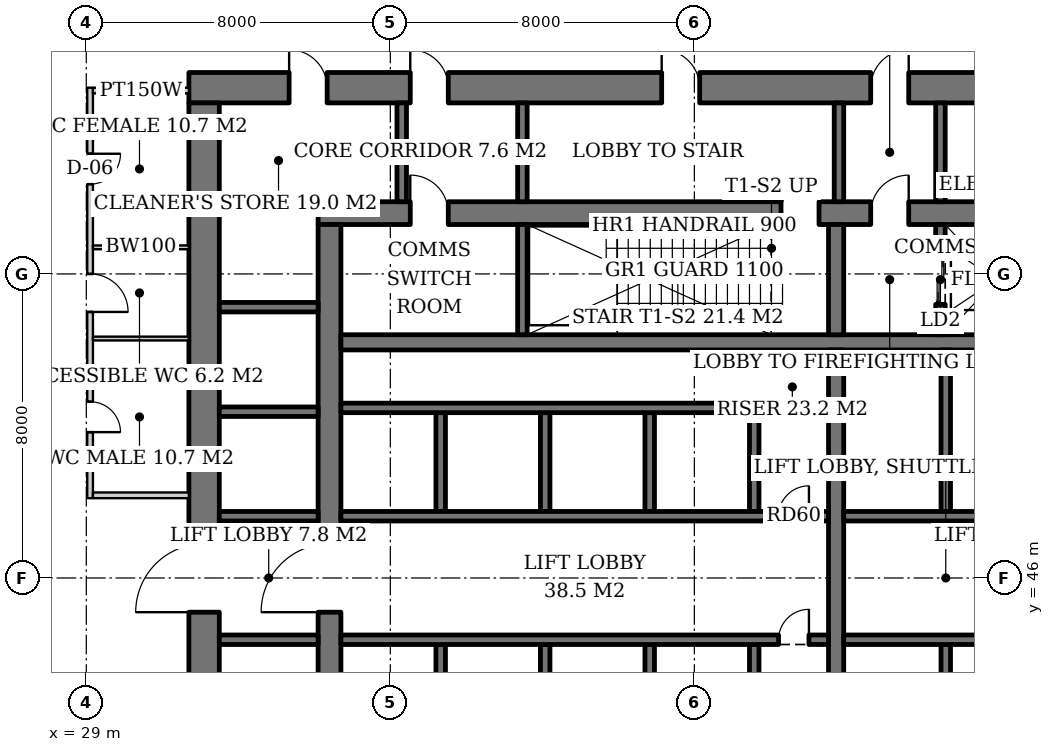
"""IFC4 building model, lengths in metres.
Left out: names, types, materials, properties, quantities, classifications, styles, units other than length and angle.
Written with IfcOpenShell. Run it as: python <this file> out.ifc"""

import sys

from ifc_helpers import new_model, si_unit, direction, frame, frame_2d, origin, place, context, subcontext, project, spatial, rectangle, extrude, element, fill, save


model = new_model("IFC4")
c1 = context("Model", 3, precision=1e-05, world=origin(), true_north=direction((0.0, 1.0)))
c2 = subcontext(c1, "Body", "Model", "MODEL_VIEW")
j1 = project(units=[si_unit("LENGTHUNIT", "METRE"), si_unit("PLANEANGLEUNIT", "RADIAN")], contexts=[c1])
p1 = place(None, origin())
s1 = spatial("IfcSite", under=j1, at=p1, CompositionType="ELEMENT")
p2 = place(p1, origin())
s2 = spatial("IfcBuilding", under=s1, at=p2, CompositionType="ELEMENT")
p3 = place(p2, frame((0.0, 0.0, -5.0)))
s3 = spatial("IfcBuildingStorey", under=s2, at=p3, CompositionType="ELEMENT", Elevation=-5.0)
p4 = place(p3, frame((35.1, 55.6, 0.0), z_axis=(0.0, 0.0, 1.0), x_axis=(1.0, 0.0, 0.0)))
e1 = element("IfcWall", 1, at=p4, inside=s3, PredefinedType="SHEAR", context=c2, shape_type="SweptSolid", body=[
    extrude(rectangle(XDim=19.8, YDim=0.6, at=frame_2d((9.9, 0.0))), origin(), (0.0, 0.0, 1.0), 5.0),
])
p5 = place(p4, frame((14.54, 0.0, 0.0)))
e2 = element("IfcOpeningElement", 2, at=p5, cuts=e1, PredefinedType="OPENING", context=c2, shape_type="SweptSolid", body=[
    extrude(rectangle(XDim=1.0, YDim=2.1, at=frame_2d((0.5, 1.05))), frame((0.0, 0.31, 0.0), z_axis=(0.0, -1.0, 0.0), x_axis=(1.0, 0.0, 0.0)), (0.0, 0.0, 1.0), 0.62),
])
p6 = place(p4, frame((12.18, 0.0, 0.0)))
e3 = element("IfcOpeningElement", 3, at=p6, cuts=e1, PredefinedType="OPENING", context=c2, shape_type="SweptSolid", body=[
    extrude(rectangle(XDim=1.0, YDim=2.1, at=frame_2d((0.5, 1.05))), frame((0.0, 0.31, 0.0), z_axis=(0.0, -1.0, 0.0), x_axis=(1.0, 0.0, 0.0)), (0.0, 0.0, 1.0), 0.62),
])
p7 = place(p4, frame((2.425, 0.0, 0.0)))
e4 = element("IfcOpeningElement", 4, at=p7, cuts=e1, PredefinedType="OPENING", context=c2, shape_type="SweptSolid", body=[
    extrude(rectangle(XDim=1.0, YDim=2.1, at=frame_2d((0.5, 1.05))), frame((0.0, 0.31, 0.0), z_axis=(0.0, -1.0, 0.0), x_axis=(1.0, 0.0, 0.0)), (0.0, 0.0, 1.0), 0.62),
])
p8 = place(p3, frame((35.4, 36.7, 0.0), z_axis=(0.0, 0.0, 1.0), x_axis=(0.0, 1.0, 0.0)))
e5 = element("IfcWall", 5, at=p8, inside=s3, PredefinedType="SHEAR", context=c2, shape_type="SweptSolid", body=[
    extrude(rectangle(XDim=18.6, YDim=0.6, at=frame_2d((9.3, 0.0))), origin(), (0.0, 0.0, 1.0), 5.0),
])
p9 = place(p8, frame((8.4, 0.0, 0.0)))
e6 = element("IfcOpeningElement", 6, at=p9, cuts=e5, PredefinedType="OPENING", context=c2, shape_type="SweptSolid", body=[
    extrude(rectangle(XDim=1.8, YDim=2.4, at=frame_2d((0.9, 1.2))), frame((0.0, 0.31, 0.0), z_axis=(0.0, -1.0, 0.0), x_axis=(1.0, 0.0, 0.0)), (0.0, 0.0, 1.0), 0.62),
])
p10 = place(p3, frame((31.7, 58.9, 0.0), z_axis=(0.0, 0.0, 1.0), x_axis=(1.0, 0.0, 0.0)))
e7 = element("IfcWall", 7, at=p10, inside=s3, PredefinedType="SHEAR", context=c2, shape_type="SweptSolid", body=[
    extrude(rectangle(XDim=26.6, YDim=0.8, at=frame_2d((13.3, 0.0))), origin(), (0.0, 0.0, 1.0), 5.0),
])
p11 = place(p10, frame((17.94, 0.0, 0.0)))
e8 = element("IfcOpeningElement", 8, at=p11, cuts=e7, PredefinedType="OPENING", context=c2, shape_type="SweptSolid", body=[
    extrude(rectangle(XDim=1.0, YDim=2.1, at=frame_2d((0.5, 1.05))), frame((0.0, 0.41, 0.0), z_axis=(0.0, -1.0, 0.0), x_axis=(1.0, 0.0, 0.0)), (0.0, 0.0, 1.0), 0.82),
])
p12 = place(p10, frame((12.44, 0.0, 0.0)))
e9 = element("IfcOpeningElement", 9, at=p12, cuts=e7, PredefinedType="OPENING", context=c2, shape_type="SweptSolid", body=[
    extrude(rectangle(XDim=1.0, YDim=2.1, at=frame_2d((0.5, 1.05))), frame((0.0, 0.41, 0.0), z_axis=(0.0, -1.0, 0.0), x_axis=(1.0, 0.0, 0.0)), (0.0, 0.0, 1.0), 0.82),
])
p13 = place(p10, frame((5.825, 0.0, 0.0)))
e10 = element("IfcOpeningElement", 10, at=p13, cuts=e7, PredefinedType="OPENING", context=c2, shape_type="SweptSolid", body=[
    extrude(rectangle(XDim=1.0, YDim=2.1, at=frame_2d((0.5, 1.05))), frame((0.0, 0.41, 0.0), z_axis=(0.0, -1.0, 0.0), x_axis=(1.0, 0.0, 0.0)), (0.0, 0.0, 1.0), 0.82),
])
p14 = place(p10, frame((2.637, 0.0, 0.0)))
e11 = element("IfcOpeningElement", 11, at=p14, cuts=e7, PredefinedType="OPENING", context=c2, shape_type="SweptSolid", body=[
    extrude(rectangle(XDim=1.0, YDim=2.1, at=frame_2d((0.5, 1.05))), frame((0.0, 0.41, 0.0), z_axis=(0.0, -1.0, 0.0), x_axis=(1.0, 0.0, 0.0)), (0.0, 0.0, 1.0), 0.82),
])
p15 = place(p10, frame((20.875, 0.0, 0.0)))
e12 = element("IfcOpeningElement", 12, at=p15, cuts=e7, PredefinedType="OPENING", context=c2, shape_type="SweptSolid", body=[
    extrude(rectangle(XDim=1.0, YDim=2.1, at=frame_2d((0.5, 1.05))), frame((0.0, 0.41, 0.0), z_axis=(0.0, -1.0, 0.0), x_axis=(1.0, 0.0, 0.0)), (0.0, 0.0, 1.0), 0.82),
])
p16 = place(p10, frame((23.7, 0.0, 0.0)))
e13 = element("IfcOpeningElement", 13, at=p16, cuts=e7, PredefinedType="OPENING", context=c2, shape_type="SweptSolid", body=[
    extrude(rectangle(XDim=1.0, YDim=2.1, at=frame_2d((0.5, 1.05))), frame((0.0, 0.41, 0.0), z_axis=(0.0, -1.0, 0.0), x_axis=(1.0, 0.0, 0.0)), (0.0, 0.0, 1.0), 0.82),
])
p17 = place(p3, frame((32.1, 33.5, 0.0), z_axis=(0.0, 0.0, 1.0), x_axis=(0.0, 1.0, 0.0)))
e14 = element("IfcWall", 14, at=p17, inside=s3, PredefinedType="SHEAR", context=c2, shape_type="SweptSolid", body=[
    extrude(rectangle(XDim=25.0, YDim=0.8, at=frame_2d((12.5, 0.0))), origin(), (0.0, 0.0, 1.0), 5.0),
])
p18 = place(p17, frame((11.6, 0.0, 0.0)))
e15 = element("IfcOpeningElement", 15, at=p18, cuts=e14, PredefinedType="OPENING", context=c2, shape_type="SweptSolid", body=[
    extrude(rectangle(XDim=1.8, YDim=2.4, at=frame_2d((0.9, 1.2))), frame((0.0, 0.41, 0.0), z_axis=(0.0, -1.0, 0.0), x_axis=(1.0, 0.0, 0.0)), (0.0, 0.0, 1.0), 0.82),
])
p19 = place(p3, frame((35.7, 52.2, 0.0), z_axis=(0.0, 0.0, 1.0), x_axis=(1.0, 0.0, 0.0)))
e16 = element("IfcWall", 16, at=p19, inside=s3, PredefinedType="SHEAR", context=c2, shape_type="SweptSolid", body=[
    extrude(rectangle(XDim=18.6, YDim=0.4, at=frame_2d((9.3, 0.0))), origin(), (0.0, 0.0, 1.0), 5.0),
])
p20 = place(p3, frame((48.73, 40.0, 0.0), z_axis=(0.0, 0.0, 1.0), x_axis=(0.0, 1.0, 0.0)))
e17 = element("IfcWall", 17, at=p20, inside=s3, PredefinedType="SHEAR", context=c2, shape_type="SweptSolid", body=[
    extrude(rectangle(XDim=12.0, YDim=0.4, at=frame_2d((6.0, 0.0))), origin(), (0.0, 0.0, 1.0), 5.0),
])
p21 = place(p3, frame((48.73, 52.4, 0.0), z_axis=(0.0, 0.0, 1.0), x_axis=(0.0, 1.0, 0.0)))
e18 = element("IfcWall", 18, at=p21, inside=s3, PredefinedType="SHEAR", context=c2, shape_type="SweptSolid", body=[
    extrude(rectangle(XDim=2.9, YDim=0.4, at=frame_2d((1.45, 0.0))), origin(), (0.0, 0.0, 1.0), 5.0),
])
p22 = place(p3, frame((40.475, 52.4, 0.0), z_axis=(0.0, 0.0, 1.0), x_axis=(0.0, 1.0, 0.0)))
e19 = element("IfcWall", 19, at=p22, inside=s3, PredefinedType="SHEAR", context=c2, shape_type="SweptSolid", body=[
    extrude(rectangle(XDim=2.9, YDim=0.25, at=frame_2d((1.45, 0.0))), origin(), (0.0, 0.0, 1.0), 5.0),
])
p23 = place(p3, frame((51.475, 52.4, 0.0), z_axis=(0.0, 0.0, 1.0), x_axis=(0.0, 1.0, 0.0)))
e20 = element("IfcWall", 20, at=p23, inside=s3, PredefinedType="SHEAR", context=c2, shape_type="SweptSolid", body=[
    extrude(rectangle(XDim=2.9, YDim=0.25, at=frame_2d((1.45, 0.0))), origin(), (0.0, 0.0, 1.0), 5.0),
])
p24 = place(p23, frame((0.8, 0.0, 0.0)))
e21 = element("IfcOpeningElement", 21, at=p24, cuts=e20, PredefinedType="OPENING", context=c2, shape_type="SweptSolid", body=[
    extrude(rectangle(XDim=1.3, YDim=2.2, at=frame_2d((0.65, 1.1))), frame((0.0, 0.135, 0.0), z_axis=(0.0, -1.0, 0.0), x_axis=(1.0, 0.0, 0.0)), (0.0, 0.0, 1.0), 0.27),
])
for number, where, z_axis, x_axis in (
    (22, (38.325, 47.75, 0.0), (0.0, 0.0, 1.0), (0.0, 1.0, 0.0)),
    (23, (41.075, 47.75, 0.0), (0.0, 0.0, 1.0), (0.0, 1.0, 0.0)),
    (24, (43.825, 47.75, 0.0), (0.0, 0.0, 1.0), (0.0, 1.0, 0.0)),
    (25, (46.575, 47.75, 0.0), (0.0, 0.0, 1.0), (0.0, 1.0, 0.0)),
):
    element("IfcWall", number, at=place(p3, frame(where, z_axis=z_axis, x_axis=x_axis)), inside=s3, PredefinedType="SHEAR", context=c2, shape_type="SweptSolid", body=[
        extrude(rectangle(XDim=2.6, YDim=0.25, at=frame_2d((1.3, 0.0))), origin(), (0.0, 0.0, 1.0), 5.0),
    ])
p25 = place(p3, frame((35.7, 50.475, 0.0), z_axis=(0.0, 0.0, 1.0), x_axis=(1.0, 0.0, 0.0)))
e26 = element("IfcWall", 26, at=p25, inside=s3, PredefinedType="SHEAR", context=c2, shape_type="SweptSolid", body=[
    extrude(rectangle(XDim=11.0, YDim=0.25, at=frame_2d((5.5, 0.0))), origin(), (0.0, 0.0, 1.0), 5.0),
])
p26 = place(p3, frame((35.7, 47.625, 0.0), z_axis=(0.0, 0.0, 1.0), x_axis=(1.0, 0.0, 0.0)))
e27 = element("IfcWall", 27, at=p26, inside=s3, PredefinedType="SHEAR", context=c2, shape_type="SweptSolid", body=[
    extrude(rectangle(XDim=12.83, YDim=0.25, at=frame_2d((6.415, 0.0))), origin(), (0.0, 0.0, 1.0), 5.0),
])
p27 = place(p26, frame((11.515, 0.0, 0.0)))
e28 = element("IfcOpeningElement", 28, at=p27, cuts=e27, PredefinedType="OPENING", context=c2, shape_type="SweptSolid", body=[
    extrude(rectangle(XDim=0.8, YDim=2.0, at=frame_2d((0.4, 1.0))), frame((0.0, 0.135, 0.0), z_axis=(0.0, -1.0, 0.0), x_axis=(1.0, 0.0, 0.0)), (0.0, 0.0, 1.0), 0.27),
])
for number, where, z_axis, x_axis in (
    (29, (38.325, 44.25, 0.0), (0.0, 0.0, 1.0), (0.0, -1.0, 0.0)),
    (30, (41.075, 44.25, 0.0), (0.0, 0.0, 1.0), (0.0, -1.0, 0.0)),
    (31, (43.825, 44.25, 0.0), (0.0, 0.0, 1.0), (0.0, -1.0, 0.0)),
    (32, (46.575, 44.25, 0.0), (0.0, 0.0, 1.0), (0.0, -1.0, 0.0)),
):
    element("IfcWall", number, at=place(p3, frame(where, z_axis=z_axis, x_axis=x_axis)), inside=s3, PredefinedType="SHEAR", context=c2, shape_type="SweptSolid", body=[
        extrude(rectangle(XDim=2.6, YDim=0.25, at=frame_2d((1.3, 0.0))), origin(), (0.0, 0.0, 1.0), 5.0),
    ])
p28 = place(p3, frame((35.7, 44.375, 0.0), z_axis=(0.0, 0.0, 1.0), x_axis=(1.0, 0.0, 0.0)))
e33 = element("IfcWall", 33, at=p28, inside=s3, PredefinedType="SHEAR", context=c2, shape_type="SweptSolid", body=[
    extrude(rectangle(XDim=12.83, YDim=0.25, at=frame_2d((6.415, 0.0))), origin(), (0.0, 0.0, 1.0), 5.0),
])
p29 = place(p28, frame((11.515, 0.0, 0.0)))
e34 = element("IfcOpeningElement", 34, at=p29, cuts=e33, PredefinedType="OPENING", context=c2, shape_type="SweptSolid", body=[
    extrude(rectangle(XDim=0.8, YDim=2.0, at=frame_2d((0.4, 1.0))), frame((0.0, 0.135, 0.0), z_axis=(0.0, -1.0, 0.0), x_axis=(1.0, 0.0, 0.0)), (0.0, 0.0, 1.0), 0.27),
])
p30 = place(p3, frame((51.615, 47.75, 0.0), z_axis=(0.0, 0.0, 1.0), x_axis=(0.0, 1.0, 0.0)))
e35 = element("IfcWall", 35, at=p30, inside=s3, PredefinedType="SHEAR", context=c2, shape_type="SweptSolid", body=[
    extrude(rectangle(XDim=4.25, YDim=0.25, at=frame_2d((2.125, 0.0))), origin(), (0.0, 0.0, 1.0), 5.0),
])
p31 = place(p3, frame((48.93, 47.625, 0.0), z_axis=(0.0, 0.0, 1.0), x_axis=(1.0, 0.0, 0.0)))
e36 = element("IfcWall", 36, at=p31, inside=s3, PredefinedType="SHEAR", context=c2, shape_type="SweptSolid", body=[
    extrude(rectangle(XDim=5.37, YDim=0.25, at=frame_2d((2.685, 0.0))), origin(), (0.0, 0.0, 1.0), 5.0),
])
p32 = place(p3, frame((51.615, 44.25, 0.0), z_axis=(0.0, 0.0, 1.0), x_axis=(0.0, -1.0, 0.0)))
e37 = element("IfcWall", 37, at=p32, inside=s3, PredefinedType="SHEAR", context=c2, shape_type="SweptSolid", body=[
    extrude(rectangle(XDim=4.25, YDim=0.25, at=frame_2d((2.125, 0.0))), origin(), (0.0, 0.0, 1.0), 5.0),
])
p33 = place(p3, frame((48.93, 44.375, 0.0), z_axis=(0.0, 0.0, 1.0), x_axis=(1.0, 0.0, 0.0)))
e38 = element("IfcWall", 38, at=p33, inside=s3, PredefinedType="SHEAR", context=c2, shape_type="SweptSolid", body=[
    extrude(rectangle(XDim=5.37, YDim=0.25, at=frame_2d((2.685, 0.0))), origin(), (0.0, 0.0, 1.0), 5.0),
])
for number, where, z_axis, x_axis in (
    (39, (32.5, 44.375, 0.0), (0.0, 0.0, 1.0), (1.0, 0.0, 0.0)),
    (40, (32.5, 47.625, 0.0), (0.0, 0.0, 1.0), (1.0, 0.0, 0.0)),
    (41, (32.5, 50.375, 0.0), (0.0, 0.0, 1.0), (1.0, 0.0, 0.0)),
    (42, (32.5, 53.125, 0.0), (0.0, 0.0, 1.0), (1.0, 0.0, 0.0)),
):
    element("IfcWall", number, at=place(p3, frame(where, z_axis=z_axis, x_axis=x_axis)), inside=s3, PredefinedType="SHEAR", context=c2, shape_type="SweptSolid", body=[
        extrude(rectangle(XDim=2.6, YDim=0.25, at=frame_2d((1.3, 0.0))), origin(), (0.0, 0.0, 1.0), 5.0),
    ])
for number, where, z_axis, x_axis in (
    (43, (48.805, 55.9, 0.0), (0.0, 0.0, 1.0), (0.0, 1.0, 0.0)),
    (44, (51.475, 55.9, 0.0), (0.0, 0.0, 1.0), (0.0, 1.0, 0.0)),
    (45, (40.475, 55.9, 0.0), (0.0, 0.0, 1.0), (0.0, 1.0, 0.0)),
    (46, (37.3, 55.9, 0.0), (0.0, 0.0, 1.0), (0.0, 1.0, 0.0)),
):
    element("IfcWall", number, at=place(p3, frame(where, z_axis=z_axis, x_axis=x_axis)), inside=s3, PredefinedType="SOLIDWALL", context=c2, shape_type="SweptSolid", body=[
        extrude(rectangle(XDim=2.6, YDim=0.25, at=frame_2d((1.3, 0.0))), origin(), (0.0, 0.0, 1.0), 4.7),
    ])
p34 = place(p3, frame((29.1, 58.9, 0.0), z_axis=(0.0, 0.0, 1.0), x_axis=(0.0, -1.0, 0.0)))
e47 = element("IfcWall", 47, at=p34, inside=s3, PredefinedType="PARTITIONING", context=c2, shape_type="SweptSolid", body=[
    extrude(rectangle(XDim=10.8, YDim=0.15, at=frame_2d((5.4, 0.0))), origin(), (0.0, 0.0, 1.0), 3.688),
])
p35 = place(p34, frame((1.738, 0.0, 0.0)))
e48 = element("IfcOpeningElement", 48, at=p35, cuts=e47, PredefinedType="OPENING", context=c2, shape_type="SweptSolid", body=[
    extrude(rectangle(XDim=0.8, YDim=2.1, at=frame_2d((0.4, 1.05))), frame((0.0, 0.085, 0.0), z_axis=(0.0, -1.0, 0.0), x_axis=(1.0, 0.0, 0.0)), (0.0, 0.0, 1.0), 0.17),
])
p36 = place(p34, frame((4.9, 0.0, 0.0)))
e49 = element("IfcOpeningElement", 49, at=p36, cuts=e47, PredefinedType="OPENING", context=c2, shape_type="SweptSolid", body=[
    extrude(rectangle(XDim=1.0, YDim=2.1, at=frame_2d((0.5, 1.05))), frame((0.0, 0.085, 0.0), z_axis=(0.0, -1.0, 0.0), x_axis=(1.0, 0.0, 0.0)), (0.0, 0.0, 1.0), 0.17),
])
p37 = place(p34, frame((8.262, 0.0, 0.0)))
e50 = element("IfcOpeningElement", 50, at=p37, cuts=e47, PredefinedType="OPENING", context=c2, shape_type="SweptSolid", body=[
    extrude(rectangle(XDim=0.8, YDim=2.1, at=frame_2d((0.4, 1.05))), frame((0.0, 0.085, 0.0), z_axis=(0.0, -1.0, 0.0), x_axis=(1.0, 0.0, 0.0)), (0.0, 0.0, 1.0), 0.17),
])
p38 = place(p3, frame((29.175, 58.825, 0.0), z_axis=(0.0, 0.0, 1.0), x_axis=(1.0, 0.0, 0.0)))
e51 = element("IfcWall", 51, at=p38, inside=s3, PredefinedType="PARTITIONING", context=c2, shape_type="SweptSolid", body=[
    extrude(rectangle(XDim=2.525, YDim=0.15, at=frame_2d((1.262, 0.0))), origin(), (0.0, 0.0, 1.0), 3.688),
])
p39 = place(p3, frame((29.175, 54.7, 0.0), z_axis=(0.0, 0.0, 1.0), x_axis=(1.0, 0.0, 0.0)))
e52 = element("IfcWall", 52, at=p39, inside=s3, PredefinedType="SOLIDWALL", context=c2, shape_type="SweptSolid", body=[
    extrude(rectangle(XDim=2.525, YDim=0.1, at=frame_2d((1.262, 0.0))), origin(), (0.0, 0.0, 1.0), 3.9),
])
p40 = place(p3, frame((29.175, 52.3, 0.0), z_axis=(0.0, 0.0, 1.0), x_axis=(1.0, 0.0, 0.0)))
e53 = element("IfcWall", 53, at=p40, inside=s3, PredefinedType="SOLIDWALL", context=c2, shape_type="SweptSolid", body=[
    extrude(rectangle(XDim=2.525, YDim=0.1, at=frame_2d((1.262, 0.0))), origin(), (0.0, 0.0, 1.0), 4.7),
])
p41 = place(p3, frame((29.175, 48.175, 0.0), z_axis=(0.0, 0.0, 1.0), x_axis=(1.0, 0.0, 0.0)))
e54 = element("IfcWall", 54, at=p41, inside=s3, PredefinedType="PARTITIONING", context=c2, shape_type="SweptSolid", body=[
    extrude(rectangle(XDim=2.525, YDim=0.15, at=frame_2d((1.262, 0.0))), origin(), (0.0, 0.0, 1.0), 4.7),
])
p42 = place(p24, origin())
e55 = element("IfcDoor", 55, at=p42, inside=s3, OperationType="DOUBLE_DOOR_SLIDING", PredefinedType="DOOR", context=c2, shape_type="SweptSolid", body=[
    extrude(rectangle(XDim=1.3, YDim=2.2, at=frame_2d((0.65, 1.1))), frame((0.0, 0.025, 0.0), z_axis=(0.0, -1.0, 0.0), x_axis=(1.0, 0.0, 0.0)), (0.0, 0.0, 1.0), 0.05),
])
fill(e21, e55)
p43 = place(p27, origin())
e56 = element("IfcDoor", 56, at=p43, inside=s3, OperationType="SINGLE_SWING_RIGHT", PredefinedType="DOOR", context=c2, shape_type="SweptSolid", body=[
    extrude(rectangle(XDim=0.8, YDim=2.0, at=frame_2d((0.4, 1.0))), frame((0.0, 0.025, 0.0), z_axis=(0.0, -1.0, 0.0), x_axis=(1.0, 0.0, 0.0)), (0.0, 0.0, 1.0), 0.05),
])
fill(e28, e56)
p44 = place(p29, origin())
e57 = element("IfcDoor", 57, at=p44, inside=s3, OperationType="SINGLE_SWING_RIGHT", PredefinedType="DOOR", context=c2, shape_type="SweptSolid", body=[
    extrude(rectangle(XDim=0.8, YDim=2.0, at=frame_2d((0.4, 1.0))), frame((0.0, 0.025, 0.0), z_axis=(0.0, -1.0, 0.0), x_axis=(1.0, 0.0, 0.0)), (0.0, 0.0, 1.0), 0.05),
])
fill(e34, e57)
p45 = place(p5, origin())
e58 = element("IfcDoor", 58, at=p45, inside=s3, OperationType="SINGLE_SWING_RIGHT", PredefinedType="DOOR", context=c2, shape_type="SweptSolid", body=[
    extrude(rectangle(XDim=1.0, YDim=2.1, at=frame_2d((0.5, 1.05))), frame((0.0, 0.025, 0.0), z_axis=(0.0, -1.0, 0.0), x_axis=(1.0, 0.0, 0.0)), (0.0, 0.0, 1.0), 0.05),
])
fill(e2, e58)
p46 = place(p9, origin())
e59 = element("IfcDoor", 59, at=p46, inside=s3, OperationType="DOUBLE_DOOR_SINGLE_SWING", PredefinedType="DOOR", context=c2, shape_type="SweptSolid", body=[
    extrude(rectangle(XDim=1.8, YDim=2.4, at=frame_2d((0.9, 1.2))), frame((0.0, 0.025, 0.0), z_axis=(0.0, -1.0, 0.0), x_axis=(1.0, 0.0, 0.0)), (0.0, 0.0, 1.0), 0.05),
])
fill(e6, e59)
p47 = place(p6, origin())
e60 = element("IfcDoor", 60, at=p47, inside=s3, OperationType="SINGLE_SWING_RIGHT", PredefinedType="DOOR", context=c2, shape_type="SweptSolid", body=[
    extrude(rectangle(XDim=1.0, YDim=2.1, at=frame_2d((0.5, 1.05))), frame((0.0, 0.025, 0.0), z_axis=(0.0, -1.0, 0.0), x_axis=(1.0, 0.0, 0.0)), (0.0, 0.0, 1.0), 0.05),
])
fill(e3, e60)
p48 = place(p18, origin())
e61 = element("IfcDoor", 61, at=p48, inside=s3, OperationType="DOUBLE_DOOR_SINGLE_SWING", PredefinedType="DOOR", context=c2, shape_type="SweptSolid", body=[
    extrude(rectangle(XDim=1.8, YDim=2.4, at=frame_2d((0.9, 1.2))), frame((0.0, 0.025, 0.0), z_axis=(0.0, -1.0, 0.0), x_axis=(1.0, 0.0, 0.0)), (0.0, 0.0, 1.0), 0.05),
])
fill(e15, e61)
p49 = place(p11, origin())
e62 = element("IfcDoor", 62, at=p49, inside=s3, OperationType="SINGLE_SWING_RIGHT", PredefinedType="DOOR", context=c2, shape_type="SweptSolid", body=[
    extrude(rectangle(XDim=1.0, YDim=2.1, at=frame_2d((0.5, 1.05))), frame((0.0, 0.025, 0.0), z_axis=(0.0, -1.0, 0.0), x_axis=(1.0, 0.0, 0.0)), (0.0, 0.0, 1.0), 0.05),
])
fill(e8, e62)
p50 = place(p12, origin())
e63 = element("IfcDoor", 63, at=p50, inside=s3, OperationType="SINGLE_SWING_LEFT", PredefinedType="DOOR", context=c2, shape_type="SweptSolid", body=[
    extrude(rectangle(XDim=1.0, YDim=2.1, at=frame_2d((0.5, 1.05))), frame((0.0, 0.025, 0.0), z_axis=(0.0, -1.0, 0.0), x_axis=(1.0, 0.0, 0.0)), (0.0, 0.0, 1.0), 0.05),
])
fill(e9, e63)
p51 = place(p13, origin())
e64 = element("IfcDoor", 64, at=p51, inside=s3, OperationType="SINGLE_SWING_LEFT", PredefinedType="DOOR", context=c2, shape_type="SweptSolid", body=[
    extrude(rectangle(XDim=1.0, YDim=2.1, at=frame_2d((0.5, 1.05))), frame((0.0, 0.025, 0.0), z_axis=(0.0, -1.0, 0.0), x_axis=(1.0, 0.0, 0.0)), (0.0, 0.0, 1.0), 0.05),
])
fill(e10, e64)
p52 = place(p7, origin())
e65 = element("IfcDoor", 65, at=p52, inside=s3, OperationType="SINGLE_SWING_LEFT", PredefinedType="DOOR", context=c2, shape_type="SweptSolid", body=[
    extrude(rectangle(XDim=1.0, YDim=2.1, at=frame_2d((0.5, 1.05))), frame((0.0, -0.24, 0.0), z_axis=(0.0, -1.0, 0.0), x_axis=(1.0, 0.0, 0.0)), (0.0, 0.0, 1.0), 0.05),
])
fill(e4, e65)
p53 = place(p14, origin())
e66 = element("IfcDoor", 66, at=p53, inside=s3, OperationType="SINGLE_SWING_LEFT", PredefinedType="DOOR", context=c2, shape_type="SweptSolid", body=[
    extrude(rectangle(XDim=1.0, YDim=2.1, at=frame_2d((0.5, 1.05))), frame((0.0, -0.34, 0.0), z_axis=(0.0, -1.0, 0.0), x_axis=(1.0, 0.0, 0.0)), (0.0, 0.0, 1.0), 0.05),
])
fill(e11, e66)
p54 = place(p35, origin())
e67 = element("IfcDoor", 67, at=p54, inside=s3, OperationType="SINGLE_SWING_LEFT", PredefinedType="DOOR", context=c2, shape_type="SweptSolid", body=[
    extrude(rectangle(XDim=0.8, YDim=2.1, at=frame_2d((0.4, 1.05))), frame((0.0, 0.025, 0.0), z_axis=(0.0, -1.0, 0.0), x_axis=(1.0, 0.0, 0.0)), (0.0, 0.0, 1.0), 0.05),
])
fill(e48, e67)
p55 = place(p36, origin())
e68 = element("IfcDoor", 68, at=p55, inside=s3, OperationType="SINGLE_SWING_RIGHT", PredefinedType="DOOR", context=c2, shape_type="SweptSolid", body=[
    extrude(rectangle(XDim=1.0, YDim=2.1, at=frame_2d((0.5, 1.05))), frame((0.0, 0.025, 0.0), z_axis=(0.0, -1.0, 0.0), x_axis=(1.0, 0.0, 0.0)), (0.0, 0.0, 1.0), 0.05),
])
fill(e49, e68)
p56 = place(p37, origin())
e69 = element("IfcDoor", 69, at=p56, inside=s3, OperationType="SINGLE_SWING_RIGHT", PredefinedType="DOOR", context=c2, shape_type="SweptSolid", body=[
    extrude(rectangle(XDim=0.8, YDim=2.1, at=frame_2d((0.4, 1.05))), frame((0.0, 0.025, 0.0), z_axis=(0.0, -1.0, 0.0), x_axis=(1.0, 0.0, 0.0)), (0.0, 0.0, 1.0), 0.05),
])
fill(e50, e69)
save(model, sys.argv[1])
